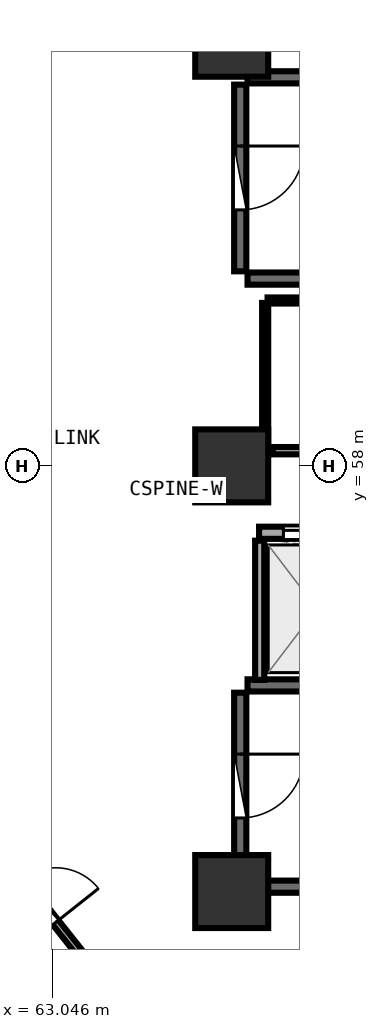
"""IFC4 building model, lengths in metres.
Left out: names, types, materials, properties, quantities, classifications, styles, units other than length and angle.
Written with IfcOpenShell. Run it as: python <this file> out.ifc"""

import sys

from ifc_helpers import new_model, si_unit, direction, frame, frame_2d, origin, origin_2d, place, context, subcontext, project, spatial, rectangle, extrude, element, fill, save


model = new_model("IFC4")
c1 = context("Model", 3, precision=1e-05, world=origin(), true_north=direction((0.0, 1.0)))
c2 = subcontext(c1, "Body", "Model", "MODEL_VIEW")
j1 = project(units=[si_unit("LENGTHUNIT", "METRE"), si_unit("PLANEANGLEUNIT", "RADIAN")], contexts=[c1])
p1 = place(None, origin())
s1 = spatial("IfcSite", under=j1, at=p1, CompositionType="ELEMENT")
p2 = place(p1, origin())
s2 = spatial("IfcBuilding", under=s1, at=p2, CompositionType="ELEMENT")
p3 = place(p2, frame((0.0, 0.0, 184.35)))
s3 = spatial("IfcBuildingStorey", under=s2, at=p3, CompositionType="ELEMENT", Elevation=184.35)
for number, where, z_axis, x_axis in (
    (1, (66.0, 51.0, 0.0), (0.0, 0.0, 1.0), (1.0, 0.0, 0.0)),
    (2, (66.0, 65.0, 0.0), (0.0, 0.0, 1.0), (1.0, 0.0, 0.0)),
    (3, (66.0, 58.0, 0.0), (0.0, 0.0, 1.0), (1.0, 0.0, 0.0)),
):
    element("IfcColumn", number, at=place(p3, frame(where, z_axis=z_axis, x_axis=x_axis)), inside=s3, PredefinedType="PILASTER", context=c2, shape_type="SweptSolid", body=[
        extrude(rectangle(XDim=1.2, YDim=1.2, at=origin_2d()), origin(), (0.0, 0.0, 1.0), 4.76),
    ])
for number, where, z_axis, x_axis in (
    (4, (66.26, 61.08, 0.0), (0.0, 0.0, 1.0), (1.0, 0.0, 0.0)),
    (5, (73.42, 64.39, 0.0), (0.0, 0.0, 1.0), (-1.0, 0.0, 0.0)),
):
    element("IfcWall", number, at=place(p3, frame(where, z_axis=z_axis, x_axis=x_axis)), inside=s3, PredefinedType="SHEAR", context=c2, shape_type="SweptSolid", body=[
        extrude(rectangle(XDim=7.16, YDim=0.2, at=frame_2d((3.58, 0.0))), origin(), (0.0, 0.0, 1.0), 4.36),
    ])
p4 = place(p3, frame((66.14, 64.27, 0.0), z_axis=(0.0, 0.0, 1.0), x_axis=(0.0, -1.0, 0.0)))
e6 = element("IfcWall", 6, at=p4, inside=s3, PredefinedType="SHEAR", context=c2, shape_type="SweptSolid", body=[
    extrude(rectangle(XDim=3.07, YDim=0.2, at=frame_2d((1.535, 0.0))), origin(), (0.0, 0.0, 1.0), 4.36),
])
p5 = place(p4, frame((1.01, 0.0, 0.0)))
e7 = element("IfcOpeningElement", 7, at=p5, cuts=e6, PredefinedType="OPENING", context=c2, shape_type="SweptSolid", body=[
    extrude(rectangle(XDim=1.05, YDim=2.1, at=frame_2d((0.525, 1.05))), frame((0.0, 0.11, 0.0), z_axis=(0.0, -1.0, 0.0), x_axis=(1.0, 0.0, 0.0)), (0.0, 0.0, 1.0), 0.22),
])
for number, where, z_axis, x_axis in (
    (8, (66.26, 51.08, 0.0), (0.0, 0.0, 1.0), (1.0, 0.0, 0.0)),
    (9, (73.42, 54.39, 0.0), (0.0, 0.0, 1.0), (-1.0, 0.0, 0.0)),
):
    element("IfcWall", number, at=place(p3, frame(where, z_axis=z_axis, x_axis=x_axis)), inside=s3, PredefinedType="SHEAR", context=c2, shape_type="SweptSolid", body=[
        extrude(rectangle(XDim=7.16, YDim=0.2, at=frame_2d((3.58, 0.0))), origin(), (0.0, 0.0, 1.0), 4.36),
    ])
p6 = place(p3, frame((66.14, 54.27, 0.0), z_axis=(0.0, 0.0, 1.0), x_axis=(0.0, -1.0, 0.0)))
e10 = element("IfcWall", 10, at=p6, inside=s3, PredefinedType="SHEAR", context=c2, shape_type="SweptSolid", body=[
    extrude(rectangle(XDim=3.07, YDim=0.2, at=frame_2d((1.535, 0.0))), origin(), (0.0, 0.0, 1.0), 4.36),
])
p7 = place(p6, frame((1.01, 0.0, 0.0)))
e11 = element("IfcOpeningElement", 11, at=p7, cuts=e10, PredefinedType="OPENING", context=c2, shape_type="SweptSolid", body=[
    extrude(rectangle(XDim=1.05, YDim=2.1, at=frame_2d((0.525, 1.05))), frame((0.0, 0.11, 0.0), z_axis=(0.0, -1.0, 0.0), x_axis=(1.0, 0.0, 0.0)), (0.0, 0.0, 1.0), 0.22),
])
p8 = place(p3, frame((66.45, 56.9, 0.0), z_axis=(0.0, 0.0, 1.0), x_axis=(1.0, 0.0, 0.0)))
e12 = element("IfcWall", 12, at=p8, inside=s3, PredefinedType="SOLIDWALL", context=c2, shape_type="SweptSolid", body=[
    extrude(rectangle(XDim=14.4, YDim=0.2, at=frame_2d((7.2, 0.0))), origin(), (0.0, 0.0, 1.0), 4.35),
])
p9 = place(p8, frame((0.4, 0.0, 0.0)))
e13 = element("IfcOpeningElement", 13, at=p9, cuts=e12, PredefinedType="OPENING", context=c2, shape_type="SweptSolid", body=[
    extrude(rectangle(XDim=1.1, YDim=2.1, at=frame_2d((0.55, 1.05))), frame((0.0, 0.11, 0.0), z_axis=(0.0, -1.0, 0.0), x_axis=(1.0, 0.0, 0.0)), (0.0, 0.0, 1.0), 0.22),
])
p10 = place(p8, frame((2.4, 0.0, 0.0)))
e14 = element("IfcOpeningElement", 14, at=p10, cuts=e12, PredefinedType="OPENING", context=c2, shape_type="SweptSolid", body=[
    extrude(rectangle(XDim=1.1, YDim=2.1, at=frame_2d((0.55, 1.05))), frame((0.0, 0.11, 0.0), z_axis=(0.0, -1.0, 0.0), x_axis=(1.0, 0.0, 0.0)), (0.0, 0.0, 1.0), 0.22),
])
p11 = place(p8, frame((4.4, 0.0, 0.0)))
e15 = element("IfcOpeningElement", 15, at=p11, cuts=e12, PredefinedType="OPENING", context=c2, shape_type="SweptSolid", body=[
    extrude(rectangle(XDim=1.1, YDim=2.1, at=frame_2d((0.55, 1.05))), frame((0.0, 0.11, 0.0), z_axis=(0.0, -1.0, 0.0), x_axis=(1.0, 0.0, 0.0)), (0.0, 0.0, 1.0), 0.22),
])
p12 = place(p3, frame((66.46, 54.48, 0.0), z_axis=(0.0, 0.0, 1.0), x_axis=(0.0, 1.0, 0.0)))
e16 = element("IfcWall", 16, at=p12, inside=s3, PredefinedType="PARTITIONING", context=c2, shape_type="SweptSolid", body=[
    extrude(rectangle(XDim=2.29, YDim=0.15, at=frame_2d((1.145, 0.0))), origin(), (0.0, 0.0, 1.0), 4.35),
])
p13 = place(p3, frame((66.675, 58.25, 0.0), z_axis=(0.0, 0.0, 1.0), x_axis=(1.0, 0.0, 0.0)))
e17 = element("IfcWall", 17, at=p13, inside=s3, PredefinedType="PARTITIONING", context=c2, shape_type="SweptSolid", body=[
    extrude(rectangle(XDim=5.715, YDim=0.12, at=frame_2d((2.857, 0.0))), origin(), (0.0, 0.0, 1.0), 4.35),
])
p14 = place(p13, frame((2.407, 0.0, 0.0)))
e18 = element("IfcOpeningElement", 18, at=p14, cuts=e17, PredefinedType="OPENING", context=c2, shape_type="SweptSolid", body=[
    extrude(rectangle(XDim=0.9, YDim=2.08, at=frame_2d((0.45, 1.04))), frame((0.0, 0.07, 0.0), z_axis=(0.0, -1.0, 0.0), x_axis=(1.0, 0.0, 0.0)), (0.0, 0.0, 1.0), 0.14),
])
p15 = place(p3, frame((61.86, 52.06, 0.0), z_axis=(0.0, 0.0, 1.0), x_axis=(0.621061577605, -0.783761773005, 0.0)))
e19 = element("IfcWall", 19, at=p15, inside=s3, PredefinedType="PARTITIONING", context=c2, shape_type="SweptSolid", body=[
    extrude(rectangle(XDim=3.103, YDim=0.12, at=frame_2d((1.552, 0.0))), origin(), (0.0, 0.0, 1.0), 2.345),
])
p16 = place(p15, frame((1.102, 0.0, 0.0)))
e20 = element("IfcOpeningElement", 20, at=p16, cuts=e19, PredefinedType="OPENING", context=c2, shape_type="SweptSolid", body=[
    extrude(rectangle(XDim=0.9, YDim=2.08, at=frame_2d((0.45, 1.04))), frame((0.0, 0.07, 0.0), z_axis=(0.0, -1.0, 0.0), x_axis=(1.0, 0.0, 0.0)), (0.0, 0.0, 1.0), 0.14),
])
p17 = place(p3, frame((72.41, 60.72, 0.0), z_axis=(0.0, 0.0, 1.0), x_axis=(-1.0, 0.0, 0.0)))
e21 = element("IfcWall", 21, at=p17, inside=s3, PredefinedType="PARTITIONING", context=c2, shape_type="SweptSolid", body=[
    extrude(rectangle(XDim=5.82, YDim=0.1, at=frame_2d((2.91, 0.0))), origin(), (0.0, 0.0, 1.0), 4.35),
])
p18 = place(p3, frame((66.55, 60.68, 0.0), z_axis=(0.0, 0.0, 1.0), x_axis=(0.0, -1.0, 0.0)))
e22 = element("IfcWall", 22, at=p18, inside=s3, PredefinedType="PARTITIONING", context=c2, shape_type="SweptSolid", body=[
    extrude(rectangle(XDim=2.383, YDim=0.1, at=frame_2d((1.191, 0.0))), origin(), (0.0, 0.0, 1.0), 4.35),
])
p19 = place(p5, origin())
e23 = element("IfcDoor", 23, at=p19, inside=s3, OperationType="SINGLE_SWING_LEFT", PredefinedType="DOOR", context=c2, shape_type="SweptSolid", body=[
    extrude(rectangle(XDim=1.05, YDim=2.1, at=frame_2d((0.525, 1.05))), frame((0.0, 0.025, 0.0), z_axis=(0.0, -1.0, 0.0), x_axis=(1.0, 0.0, 0.0)), (0.0, 0.0, 1.0), 0.05),
])
fill(e7, e23)
p20 = place(p7, origin())
e24 = element("IfcDoor", 24, at=p20, inside=s3, OperationType="SINGLE_SWING_LEFT", PredefinedType="DOOR", context=c2, shape_type="SweptSolid", body=[
    extrude(rectangle(XDim=1.05, YDim=2.1, at=frame_2d((0.525, 1.05))), frame((0.0, 0.025, 0.0), z_axis=(0.0, -1.0, 0.0), x_axis=(1.0, 0.0, 0.0)), (0.0, 0.0, 1.0), 0.05),
])
fill(e11, e24)
p21 = place(p9, origin())
e25 = element("IfcDoor", 25, at=p21, inside=s3, OperationType="DOUBLE_DOOR_SLIDING", PredefinedType="DOOR", context=c2, shape_type="SweptSolid", body=[
    extrude(rectangle(XDim=1.1, YDim=2.1, at=frame_2d((0.55, 1.05))), frame((0.0, 0.025, 0.0), z_axis=(0.0, -1.0, 0.0), x_axis=(1.0, 0.0, 0.0)), (0.0, 0.0, 1.0), 0.05),
])
fill(e13, e25)
p22 = place(p16, origin())
e26 = element("IfcDoor", 26, at=p22, inside=s3, OperationType="SINGLE_SWING_RIGHT", PredefinedType="DOOR", context=c2, shape_type="SweptSolid", body=[
    extrude(rectangle(XDim=0.9, YDim=2.08, at=frame_2d((0.45, 1.04))), frame((0.0, 0.025, 0.0), z_axis=(0.0, -1.0, 0.0), x_axis=(1.0, 0.0, 0.0)), (0.0, 0.0, 1.0), 0.05),
])
fill(e20, e26)
save(model, sys.argv[1])
